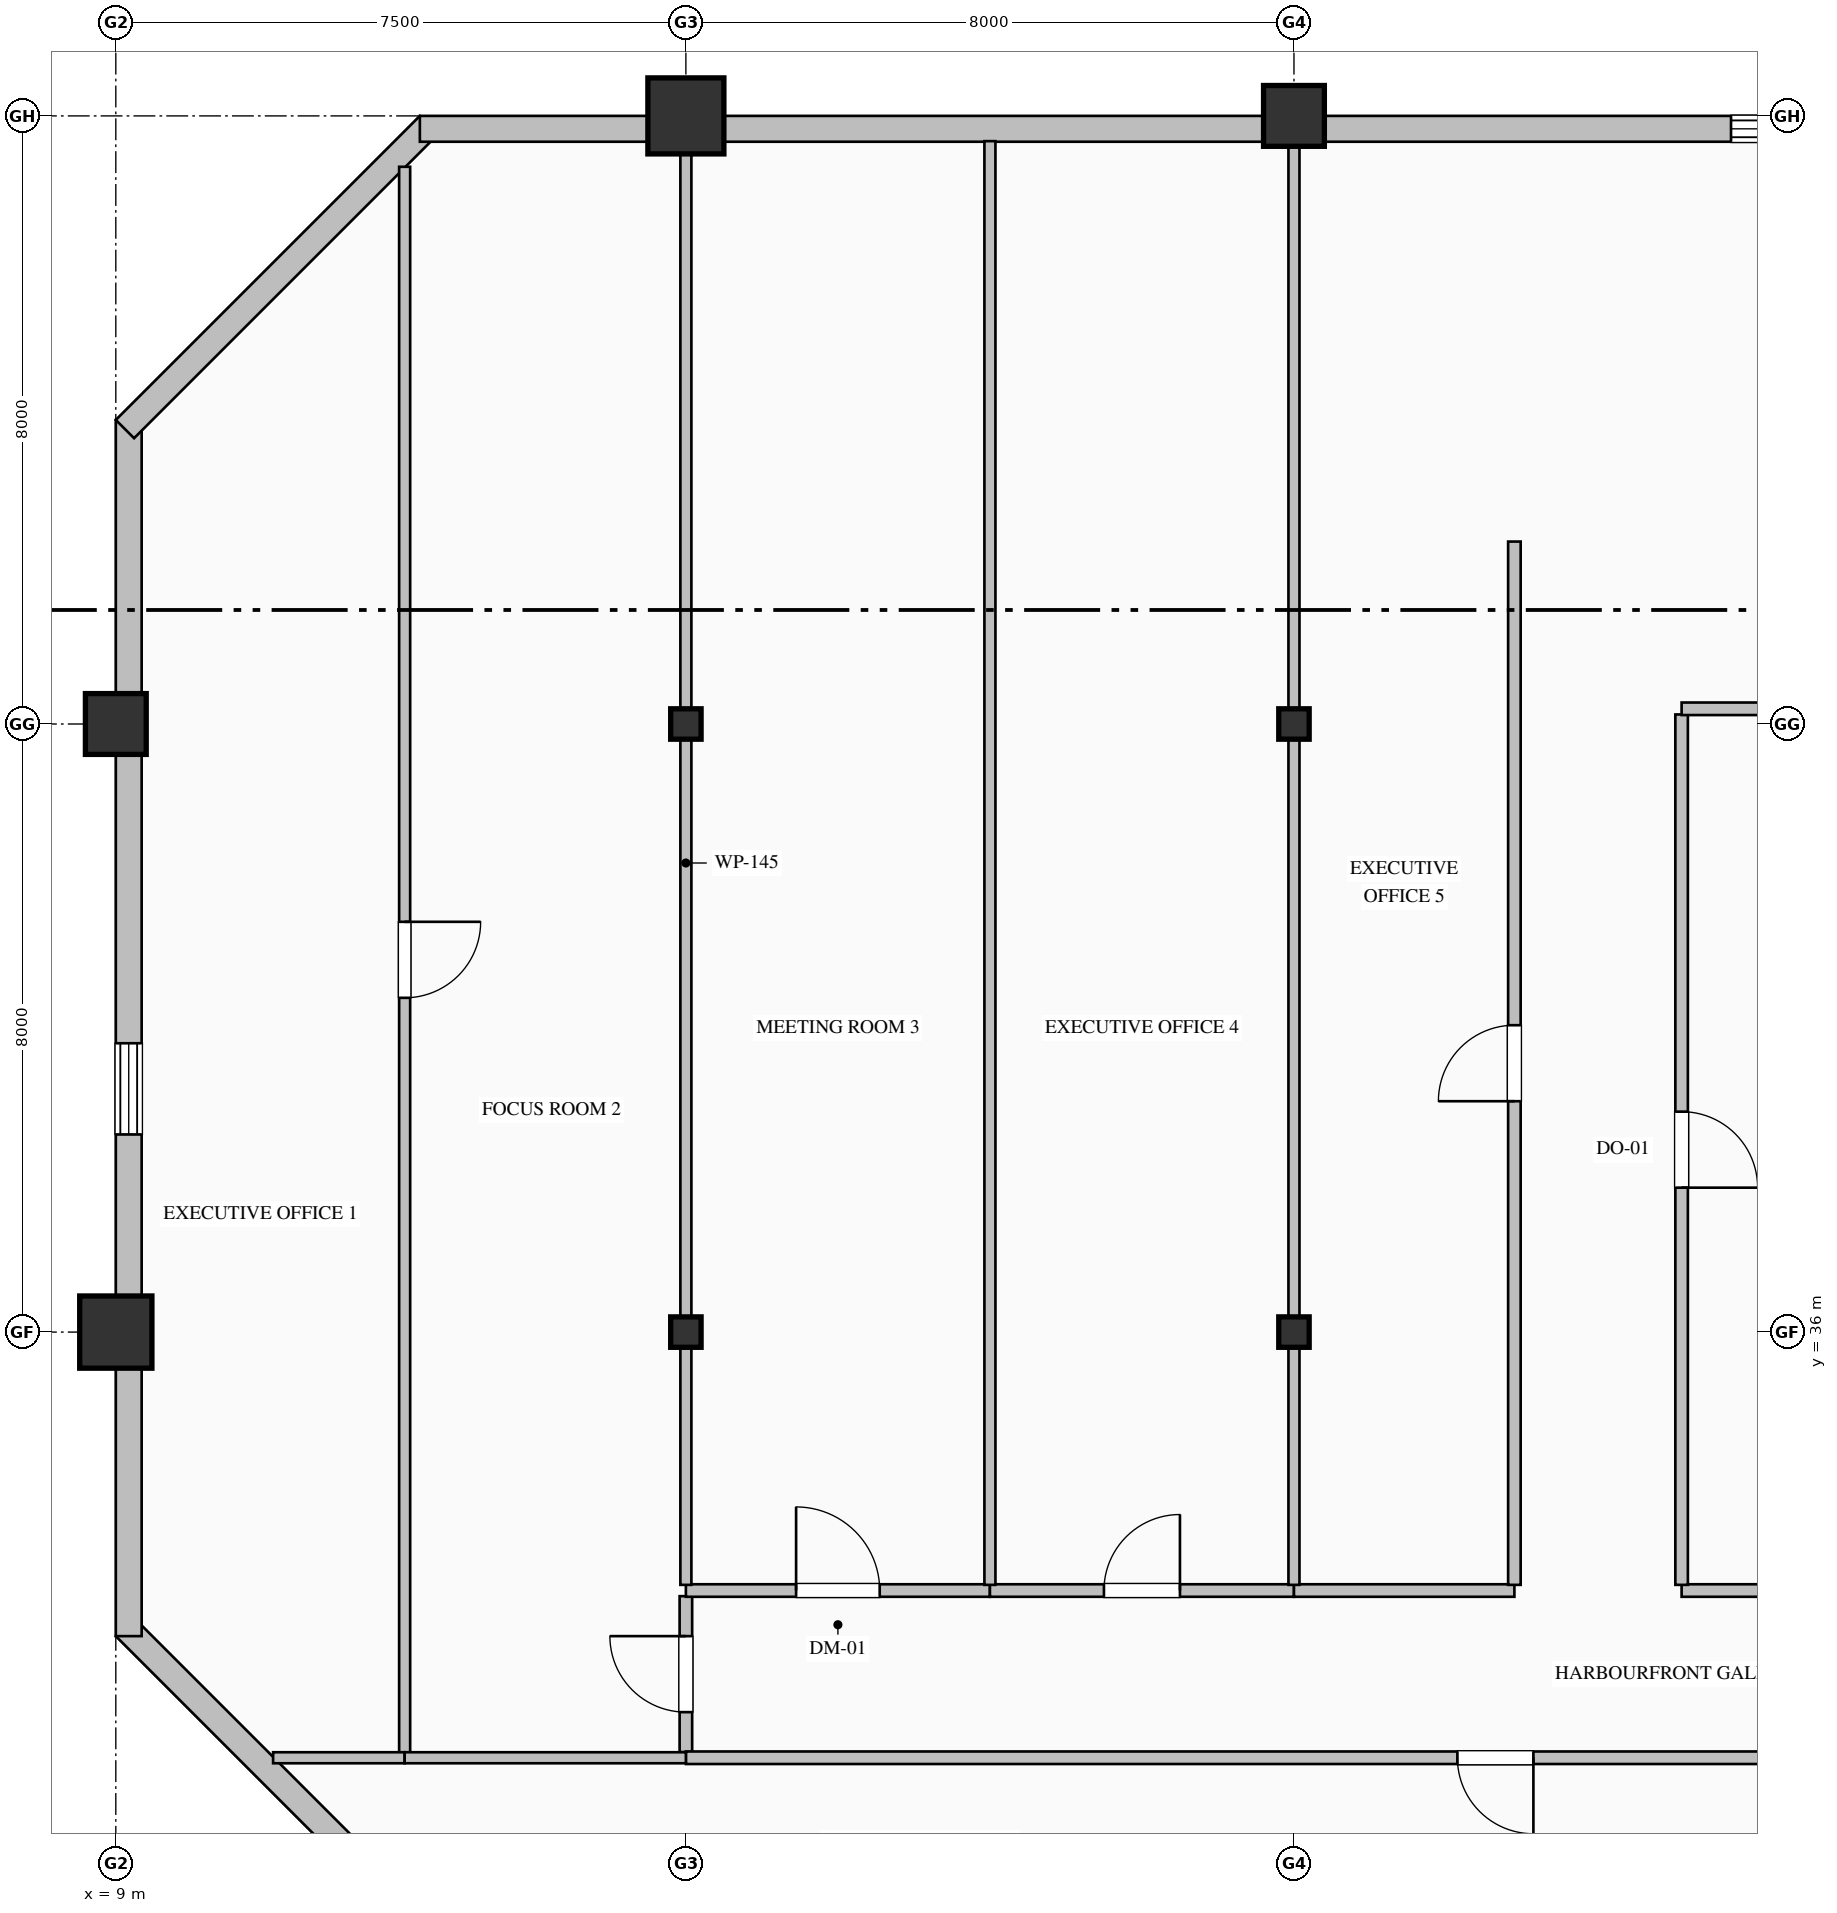
"""IFC4 building model, lengths in metres.
Left out: names, types, materials, properties, quantities, classifications, styles, units other than length and angle.
Written with IfcOpenShell. Run it as: python <this file> out.ifc"""

import sys

from ifc_helpers import new_model, si_unit, direction, frame, frame_2d, origin, origin_2d, place, context, subcontext, project, spatial, rectangle, hollow_rectangle, hollow_circle, i_section, extrude, element, fill, save


model = new_model("IFC4")
c1 = context("Model", 3, precision=1e-05, world=origin(), true_north=direction((0.0, 1.0)))
c2 = subcontext(c1, "Body", "Model", "MODEL_VIEW")
j1 = project(units=[si_unit("LENGTHUNIT", "METRE"), si_unit("PLANEANGLEUNIT", "RADIAN")], contexts=[c1])
p1 = place(None, origin())
s1 = spatial("IfcSite", under=j1, at=p1, CompositionType="ELEMENT")
p2 = place(p1, origin())
s2 = spatial("IfcBuilding", under=s1, at=p2, CompositionType="ELEMENT")
p3 = place(p2, frame((0.0, 0.0, 209.8)))
s3 = spatial("IfcBuildingStorey", under=s2, at=p3, CompositionType="ELEMENT", Elevation=209.8)
p4 = place(p3, frame((9.0, 36.0, 0.0), z_axis=(0.0, 0.0, 1.0), x_axis=(1.0, 0.0, 0.0)))
e1 = element("IfcColumn", 1, at=p4, inside=s3, PredefinedType="COLUMN", context=c2, shape_type="SweptSolid", body=[
    extrude(hollow_rectangle(XDim=0.95, YDim=0.95, WallThickness=0.036, at=origin_2d()), origin(), (0.0, 0.0, 1.0), 4.0),
])
p5 = place(p3, frame((9.0, 44.0, 0.0), z_axis=(0.0, 0.0, 1.0), x_axis=(1.0, 0.0, 0.0)))
e2 = element("IfcColumn", 2, at=p5, inside=s3, PredefinedType="COLUMN", context=c2, shape_type="SweptSolid", body=[
    extrude(hollow_rectangle(XDim=0.8, YDim=0.8, WallThickness=0.032, at=origin_2d()), origin(), (0.0, 0.0, 1.0), 4.0),
])
for number, where, z_axis, x_axis in (
    (3, (16.5, 36.0, 0.0), (0.0, 0.0, 1.0), (1.0, 0.0, 0.0)),
    (4, (16.5, 44.0, 0.0), (0.0, 0.0, 1.0), (1.0, 0.0, 0.0)),
):
    element("IfcColumn", number, at=place(p3, frame(where, z_axis=z_axis, x_axis=x_axis)), inside=s3, PredefinedType="COLUMN", context=c2, shape_type="SweptSolid", body=[
        extrude(i_section(OverallWidth=0.4, OverallDepth=0.4, WebThickness=0.013, FlangeThickness=0.021, FilletRadius=0.022, at=origin_2d()), origin(), (0.0, 0.0, 1.0), 4.0),
    ])
p6 = place(p3, frame((16.5, 52.0, 0.0), z_axis=(0.0, 0.0, 1.0), x_axis=(1.0, 0.0, 0.0)))
e5 = element("IfcColumn", 5, at=p6, inside=s3, PredefinedType="COLUMN", context=c2, shape_type="SweptSolid", body=[
    extrude(hollow_circle(Radius=0.5, WallThickness=0.036, at=origin_2d()), origin(), (0.0, 0.0, 1.0), 4.0),
])
for number, where, z_axis, x_axis in (
    (6, (24.5, 36.0, 0.0), (0.0, 0.0, 1.0), (1.0, 0.0, 0.0)),
    (7, (24.5, 44.0, 0.0), (0.0, 0.0, 1.0), (1.0, 0.0, 0.0)),
):
    element("IfcColumn", number, at=place(p3, frame(where, z_axis=z_axis, x_axis=x_axis)), inside=s3, PredefinedType="COLUMN", context=c2, shape_type="SweptSolid", body=[
        extrude(i_section(OverallWidth=0.4, OverallDepth=0.4, WebThickness=0.013, FlangeThickness=0.021, FilletRadius=0.022, at=origin_2d()), origin(), (0.0, 0.0, 1.0), 4.0),
    ])
p7 = place(p3, frame((24.5, 52.0, 0.0), z_axis=(0.0, 0.0, 1.0), x_axis=(1.0, 0.0, 0.0)))
e8 = element("IfcColumn", 8, at=p7, inside=s3, PredefinedType="COLUMN", context=c2, shape_type="SweptSolid", body=[
    extrude(hollow_rectangle(XDim=0.8, YDim=0.8, WallThickness=0.032, at=origin_2d()), origin(), (0.0, 0.0, 1.0), 4.0),
])
p8 = place(p3, frame((13.12, 28.12, 0.0), z_axis=(0.0, 0.0, 1.0), x_axis=(-0.707106781187, 0.707106781187, 0.0)))
e9 = element("IfcWall", 9, at=p8, inside=s3, PredefinedType="SOLIDWALL", context=c2, shape_type="SweptSolid", body=[
    extrude(rectangle(XDim=5.657, YDim=0.34, at=frame_2d((2.828, 0.0))), origin(), (0.0, 0.0, 1.0), 3.775),
])
p9 = place(p3, frame((9.17, 32.0, 0.0), z_axis=(0.0, 0.0, 1.0), x_axis=(0.0, 1.0, 0.0)))
e10 = element("IfcWall", 10, at=p9, inside=s3, PredefinedType="SOLIDWALL", context=c2, shape_type="SweptSolid", body=[
    extrude(rectangle(XDim=16.0, YDim=0.34, at=frame_2d((8.0, 0.0))), origin(), (0.0, 0.0, 1.0), 3.325),
])
p10 = place(p9, frame((6.6, 0.0, 0.9)))
e11 = element("IfcOpeningElement", 11, at=p10, cuts=e10, PredefinedType="OPENING", context=c2, shape_type="SweptSolid", body=[
    extrude(rectangle(XDim=1.2, YDim=1.85, at=frame_2d((0.6, 0.925))), frame((0.0, 0.18, 0.0), z_axis=(0.0, -1.0, 0.0), x_axis=(1.0, 0.0, 0.0)), (0.0, 0.0, 1.0), 0.36),
])
p11 = place(p3, frame((9.12, 47.88, 0.0), z_axis=(0.0, 0.0, 1.0), x_axis=(0.707106781187, 0.707106781187, 0.0)))
e12 = element("IfcWall", 12, at=p11, inside=s3, PredefinedType="SOLIDWALL", context=c2, shape_type="SweptSolid", body=[
    extrude(rectangle(XDim=5.657, YDim=0.34, at=frame_2d((2.828, 0.0))), origin(), (0.0, 0.0, 1.0), 3.775),
])
p12 = place(p3, frame((13.0, 51.83, 0.0), z_axis=(0.0, 0.0, 1.0), x_axis=(1.0, 0.0, 0.0)))
e13 = element("IfcWall", 13, at=p12, inside=s3, PredefinedType="SOLIDWALL", context=c2, shape_type="SweptSolid", body=[
    extrude(rectangle(XDim=27.52, YDim=0.34, at=frame_2d((13.76, 0.0))), origin(), (0.0, 0.0, 1.0), 3.325),
])
p13 = place(p12, frame((17.25, 0.0, 0.7)))
e14 = element("IfcOpeningElement", 14, at=p13, cuts=e13, PredefinedType="OPENING", context=c2, shape_type="SweptSolid", body=[
    extrude(rectangle(XDim=1.5, YDim=2.4, at=frame_2d((0.75, 1.2))), frame((0.0, 0.18, 0.0), z_axis=(0.0, -1.0, 0.0), x_axis=(1.0, 0.0, 0.0)), (0.0, 0.0, 1.0), 0.36),
])
p14 = place(p3, frame((29.6, 32.6, 0.0), z_axis=(0.0, 0.0, 1.0), x_axis=(1.0, 0.0, 0.0)))
e15 = element("IfcWall", 15, at=p14, inside=s3, PredefinedType="PARTITIONING", context=c2, shape_type="SweptSolid", body=[
    extrude(rectangle(XDim=8.2, YDim=0.165, at=frame_2d((4.1, 0.0))), origin(), (0.0, 0.0, 1.0), 3.775),
])
p15 = place(p3, frame((16.5, 30.475, 0.0), z_axis=(0.0, 0.0, 1.0), x_axis=(0.0, 1.0, 0.0)))
e16 = element("IfcWall", 16, at=p15, inside=s3, PredefinedType="PARTITIONING", context=c2, shape_type="SweptSolid", body=[
    extrude(rectangle(XDim=2.051, YDim=0.165, at=frame_2d((1.025, 0.0))), origin(), (0.0, 0.0, 1.0), 3.179),
])
p16 = place(p15, frame((0.525, 0.0, 0.0)))
e17 = element("IfcOpeningElement", 17, at=p16, cuts=e16, PredefinedType="OPENING", context=c2, shape_type="SweptSolid", body=[
    extrude(rectangle(XDim=1.0, YDim=2.15, at=frame_2d((0.5, 1.075))), frame((0.0, 0.093, 0.0), z_axis=(0.0, -1.0, 0.0), x_axis=(1.0, 0.0, 0.0)), (0.0, 0.0, 1.0), 0.185),
])
p17 = place(p3, frame((16.5, 32.6, 0.0), z_axis=(0.0, 0.0, 1.0), x_axis=(1.0, 0.0, 0.0)))
e18 = element("IfcWall", 18, at=p17, inside=s3, PredefinedType="PARTITIONING", context=c2, shape_type="SweptSolid", body=[
    extrude(rectangle(XDim=4.0, YDim=0.165, at=frame_2d((2.0, 0.0))), origin(), (0.0, 0.0, 1.0), 3.775),
])
p18 = place(p17, frame((1.45, 0.0, 0.0)))
e19 = element("IfcOpeningElement", 19, at=p18, cuts=e18, PredefinedType="OPENING", context=c2, shape_type="SweptSolid", body=[
    extrude(rectangle(XDim=1.1, YDim=2.2, at=frame_2d((0.55, 1.1))), frame((0.0, 0.093, 0.0), z_axis=(0.0, -1.0, 0.0), x_axis=(1.0, 0.0, 0.0)), (0.0, 0.0, 1.0), 0.185),
])
p19 = place(p3, frame((20.5, 32.6, 0.0), z_axis=(0.0, 0.0, 1.0), x_axis=(1.0, 0.0, 0.0)))
e20 = element("IfcWall", 20, at=p19, inside=s3, PredefinedType="PARTITIONING", context=c2, shape_type="SweptSolid", body=[
    extrude(rectangle(XDim=4.0, YDim=0.165, at=frame_2d((2.0, 0.0))), origin(), (0.0, 0.0, 1.0), 3.775),
])
p20 = place(p19, frame((1.5, 0.0, 0.0)))
e21 = element("IfcOpeningElement", 21, at=p20, cuts=e20, PredefinedType="OPENING", context=c2, shape_type="SweptSolid", body=[
    extrude(rectangle(XDim=1.0, YDim=2.15, at=frame_2d((0.5, 1.075))), frame((0.0, 0.093, 0.0), z_axis=(0.0, -1.0, 0.0), x_axis=(1.0, 0.0, 0.0)), (0.0, 0.0, 1.0), 0.185),
])
p21 = place(p3, frame((24.5, 32.6, 0.0), z_axis=(0.0, 0.0, 1.0), x_axis=(1.0, 0.0, 0.0)))
e22 = element("IfcWall", 22, at=p21, inside=s3, PredefinedType="PARTITIONING", context=c2, shape_type="SweptSolid", body=[
    extrude(rectangle(XDim=2.9, YDim=0.165, at=frame_2d((1.45, 0.0))), origin(), (0.0, 0.0, 1.0), 3.775),
])
p22 = place(p3, frame((37.8, 30.4, 0.0), z_axis=(0.0, 0.0, 1.0), x_axis=(-1.0, 0.0, 0.0)))
e23 = element("IfcWall", 23, at=p22, inside=s3, PredefinedType="PARTITIONING", context=c2, shape_type="SweptSolid", body=[
    extrude(rectangle(XDim=21.3, YDim=0.165, at=frame_2d((10.65, 0.0))), origin(), (0.0, 0.0, 1.0), 3.775),
])
p23 = place(p22, frame((10.15, 0.0, 0.0)))
e24 = element("IfcOpeningElement", 24, at=p23, cuts=e23, PredefinedType="OPENING", context=c2, shape_type="SweptSolid", body=[
    extrude(rectangle(XDim=1.0, YDim=2.15, at=frame_2d((0.5, 1.075))), frame((0.0, 0.093, 0.0), z_axis=(0.0, -1.0, 0.0), x_axis=(1.0, 0.0, 0.0)), (0.0, 0.0, 1.0), 0.185),
])
p24 = place(p3, frame((29.6, 44.125, 0.0), z_axis=(0.0, 0.0, 1.0), x_axis=(0.0, -1.0, 0.0)))
e25 = element("IfcWall", 25, at=p24, inside=s3, PredefinedType="PARTITIONING", context=c2, shape_type="SweptSolid", body=[
    extrude(rectangle(XDim=11.451, YDim=0.165, at=frame_2d((5.726, 0.0))), origin(), (0.0, 0.0, 1.0), 3.775),
])
p25 = place(p24, frame((5.226, 0.0, 0.0)))
e26 = element("IfcOpeningElement", 26, at=p25, cuts=e25, PredefinedType="OPENING", context=c2, shape_type="SweptSolid", body=[
    extrude(rectangle(XDim=1.0, YDim=2.15, at=frame_2d((0.5, 1.075))), frame((0.0, 0.093, 0.0), z_axis=(0.0, -1.0, 0.0), x_axis=(1.0, 0.0, 0.0)), (0.0, 0.0, 1.0), 0.185),
])
p26 = place(p3, frame((27.4, 32.675, 0.0), z_axis=(0.0, 0.0, 1.0), x_axis=(0.0, 1.0, 0.0)))
e27 = element("IfcWall", 27, at=p26, inside=s3, PredefinedType="PARTITIONING", context=c2, shape_type="SweptSolid", body=[
    extrude(rectangle(XDim=13.725, YDim=0.165, at=frame_2d((6.863, 0.0))), origin(), (0.0, 0.0, 1.0), 3.775),
])
p27 = place(p26, frame((6.363, 0.0, 0.0)))
e28 = element("IfcOpeningElement", 28, at=p27, cuts=e27, PredefinedType="OPENING", context=c2, shape_type="SweptSolid", body=[
    extrude(rectangle(XDim=1.0, YDim=2.15, at=frame_2d((0.5, 1.075))), frame((0.0, 0.093, 0.0), z_axis=(0.0, -1.0, 0.0), x_axis=(1.0, 0.0, 0.0)), (0.0, 0.0, 1.0), 0.185),
])
p28 = place(p3, frame((37.8, 44.2, 0.0), z_axis=(0.0, 0.0, 1.0), x_axis=(-1.0, 0.0, 0.0)))
e29 = element("IfcWall", 29, at=p28, inside=s3, PredefinedType="PARTITIONING", context=c2, shape_type="SweptSolid", body=[
    extrude(rectangle(XDim=8.2, YDim=0.165, at=frame_2d((4.1, 0.0))), origin(), (0.0, 0.0, 1.0), 3.775),
])
p29 = place(p3, frame((12.8, 51.331, 0.0), z_axis=(0.0, 0.0, 1.0), x_axis=(0.0, -1.0, 0.0)))
e30 = element("IfcWall", 30, at=p29, inside=s3, PredefinedType="PARTITIONING", context=c2, shape_type="SweptSolid", body=[
    extrude(rectangle(XDim=20.866, YDim=0.145, at=frame_2d((10.433, 0.0))), origin(), (0.0, 0.0, 1.0), 3.775),
])
p30 = place(p29, frame((9.933, 0.0, 0.0)))
e31 = element("IfcOpeningElement", 31, at=p30, cuts=e30, PredefinedType="OPENING", context=c2, shape_type="SweptSolid", body=[
    extrude(rectangle(XDim=1.0, YDim=2.15, at=frame_2d((0.5, 1.075))), frame((0.0, 0.083, 0.0), z_axis=(0.0, -1.0, 0.0), x_axis=(1.0, 0.0, 0.0)), (0.0, 0.0, 1.0), 0.165),
])
p31 = place(p3, frame((12.8, 30.4, 0.0), z_axis=(0.0, 0.0, 1.0), x_axis=(-1.0, 0.0, 0.0)))
e32 = element("IfcWall", 32, at=p31, inside=s3, PredefinedType="PARTITIONING", context=c2, shape_type="SweptSolid", body=[
    extrude(rectangle(XDim=1.73, YDim=0.145, at=frame_2d((0.865, 0.0))), origin(), (0.0, 0.0, 1.0), 3.775),
])
p32 = place(p3, frame((16.5, 51.668, 0.0), z_axis=(0.0, 0.0, 1.0), x_axis=(0.0, -1.0, 0.0)))
e33 = element("IfcWall", 33, at=p32, inside=s3, PredefinedType="PARTITIONING", context=c2, shape_type="SweptSolid", body=[
    extrude(rectangle(XDim=18.993, YDim=0.145, at=frame_2d((9.497, 0.0))), origin(), (0.0, 0.0, 1.0), 3.179),
])
p33 = place(p3, frame((16.5, 30.4, 0.0), z_axis=(0.0, 0.0, 1.0), x_axis=(-1.0, 0.0, 0.0)))
e34 = element("IfcWall", 34, at=p33, inside=s3, PredefinedType="PARTITIONING", context=c2, shape_type="SweptSolid", body=[
    extrude(rectangle(XDim=3.7, YDim=0.145, at=frame_2d((1.85, 0.0))), origin(), (0.0, 0.0, 1.0), 3.775),
])
p34 = place(p3, frame((20.5, 51.668, 0.0), z_axis=(0.0, 0.0, 1.0), x_axis=(0.0, -1.0, 0.0)))
e35 = element("IfcWall", 35, at=p34, inside=s3, PredefinedType="PARTITIONING", context=c2, shape_type="SweptSolid", body=[
    extrude(rectangle(XDim=18.993, YDim=0.145, at=frame_2d((9.497, 0.0))), origin(), (0.0, 0.0, 1.0), 3.775),
])
p35 = place(p3, frame((24.5, 51.668, 0.0), z_axis=(0.0, 0.0, 1.0), x_axis=(0.0, -1.0, 0.0)))
e36 = element("IfcWall", 36, at=p35, inside=s3, PredefinedType="PARTITIONING", context=c2, shape_type="SweptSolid", body=[
    extrude(rectangle(XDim=18.993, YDim=0.145, at=frame_2d((9.497, 0.0))), origin(), (0.0, 0.0, 1.0), 3.179),
])
p36 = place(p10, origin())
e37 = element("IfcWindow", 37, at=p36, inside=s3, PartitioningType="DOUBLE_PANEL_VERTICAL", PredefinedType="WINDOW", context=c2, shape_type="SweptSolid", body=[
    extrude(rectangle(XDim=1.2, YDim=1.85, at=frame_2d((0.6, 0.925))), frame((0.0, 0.15, 0.0), z_axis=(0.0, -1.0, 0.0), x_axis=(1.0, 0.0, 0.0)), (0.0, 0.0, 1.0), 0.06),
])
fill(e11, e37)
p37 = place(p13, origin())
e38 = element("IfcWindow", 38, at=p37, inside=s3, PartitioningType="DOUBLE_PANEL_HORIZONTAL", PredefinedType="WINDOW", context=c2, shape_type="SweptSolid", body=[
    extrude(rectangle(XDim=1.5, YDim=2.4, at=frame_2d((0.75, 1.2))), frame((0.0, 0.15, 0.0), z_axis=(0.0, -1.0, 0.0), x_axis=(1.0, 0.0, 0.0)), (0.0, 0.0, 1.0), 0.06),
])
fill(e14, e38)
p38 = place(p25, origin())
e39 = element("IfcDoor", 39, at=p38, inside=s3, OperationType="SINGLE_SWING_RIGHT", PredefinedType="DOOR", context=c2, shape_type="SweptSolid", body=[
    extrude(rectangle(XDim=1.0, YDim=2.15, at=frame_2d((0.5, 1.075))), frame((0.0, 0.025, 0.0), z_axis=(0.0, -1.0, 0.0), x_axis=(1.0, 0.0, 0.0)), (0.0, 0.0, 1.0), 0.05),
])
fill(e26, e39)
p39 = place(p30, origin())
e40 = element("IfcDoor", 40, at=p39, inside=s3, OperationType="SINGLE_SWING_LEFT", PredefinedType="DOOR", context=c2, shape_type="SweptSolid", body=[
    extrude(rectangle(XDim=1.0, YDim=2.15, at=frame_2d((0.5, 1.075))), frame((0.0, 0.025, 0.0), z_axis=(0.0, -1.0, 0.0), x_axis=(1.0, 0.0, 0.0)), (0.0, 0.0, 1.0), 0.05),
])
fill(e31, e40)
p40 = place(p16, origin())
e41 = element("IfcDoor", 41, at=p40, inside=s3, OperationType="SINGLE_SWING_RIGHT", PredefinedType="DOOR", context=c2, shape_type="SweptSolid", body=[
    extrude(rectangle(XDim=1.0, YDim=2.15, at=frame_2d((0.5, 1.075))), frame((0.0, 0.025, 0.0), z_axis=(0.0, -1.0, 0.0), x_axis=(1.0, 0.0, 0.0)), (0.0, 0.0, 1.0), 0.05),
])
fill(e17, e41)
p41 = place(p18, origin())
e42 = element("IfcDoor", 42, at=p41, inside=s3, OperationType="SINGLE_SWING_LEFT", PredefinedType="DOOR", context=c2, shape_type="SweptSolid", body=[
    extrude(rectangle(XDim=1.1, YDim=2.2, at=frame_2d((0.55, 1.1))), frame((0.0, 0.025, 0.0), z_axis=(0.0, -1.0, 0.0), x_axis=(1.0, 0.0, 0.0)), (0.0, 0.0, 1.0), 0.05),
])
fill(e19, e42)
p42 = place(p20, origin())
e43 = element("IfcDoor", 43, at=p42, inside=s3, OperationType="SINGLE_SWING_RIGHT", PredefinedType="DOOR", context=c2, shape_type="SweptSolid", body=[
    extrude(rectangle(XDim=1.0, YDim=2.15, at=frame_2d((0.5, 1.075))), frame((0.0, 0.025, 0.0), z_axis=(0.0, -1.0, 0.0), x_axis=(1.0, 0.0, 0.0)), (0.0, 0.0, 1.0), 0.05),
])
fill(e21, e43)
p43 = place(p27, origin())
e44 = element("IfcDoor", 44, at=p43, inside=s3, OperationType="SINGLE_SWING_LEFT", PredefinedType="DOOR", context=c2, shape_type="SweptSolid", body=[
    extrude(rectangle(XDim=1.0, YDim=2.15, at=frame_2d((0.5, 1.075))), frame((0.0, 0.025, 0.0), z_axis=(0.0, -1.0, 0.0), x_axis=(1.0, 0.0, 0.0)), (0.0, 0.0, 1.0), 0.05),
])
fill(e28, e44)
p44 = place(p23, origin())
e45 = element("IfcDoor", 45, at=p44, inside=s3, OperationType="SINGLE_SWING_LEFT", PredefinedType="DOOR", context=c2, shape_type="SweptSolid", body=[
    extrude(rectangle(XDim=1.0, YDim=2.15, at=frame_2d((0.5, 1.075))), frame((0.0, 0.025, 0.0), z_axis=(0.0, -1.0, 0.0), x_axis=(1.0, 0.0, 0.0)), (0.0, 0.0, 1.0), 0.05),
])
fill(e24, e45)
save(model, sys.argv[1])
